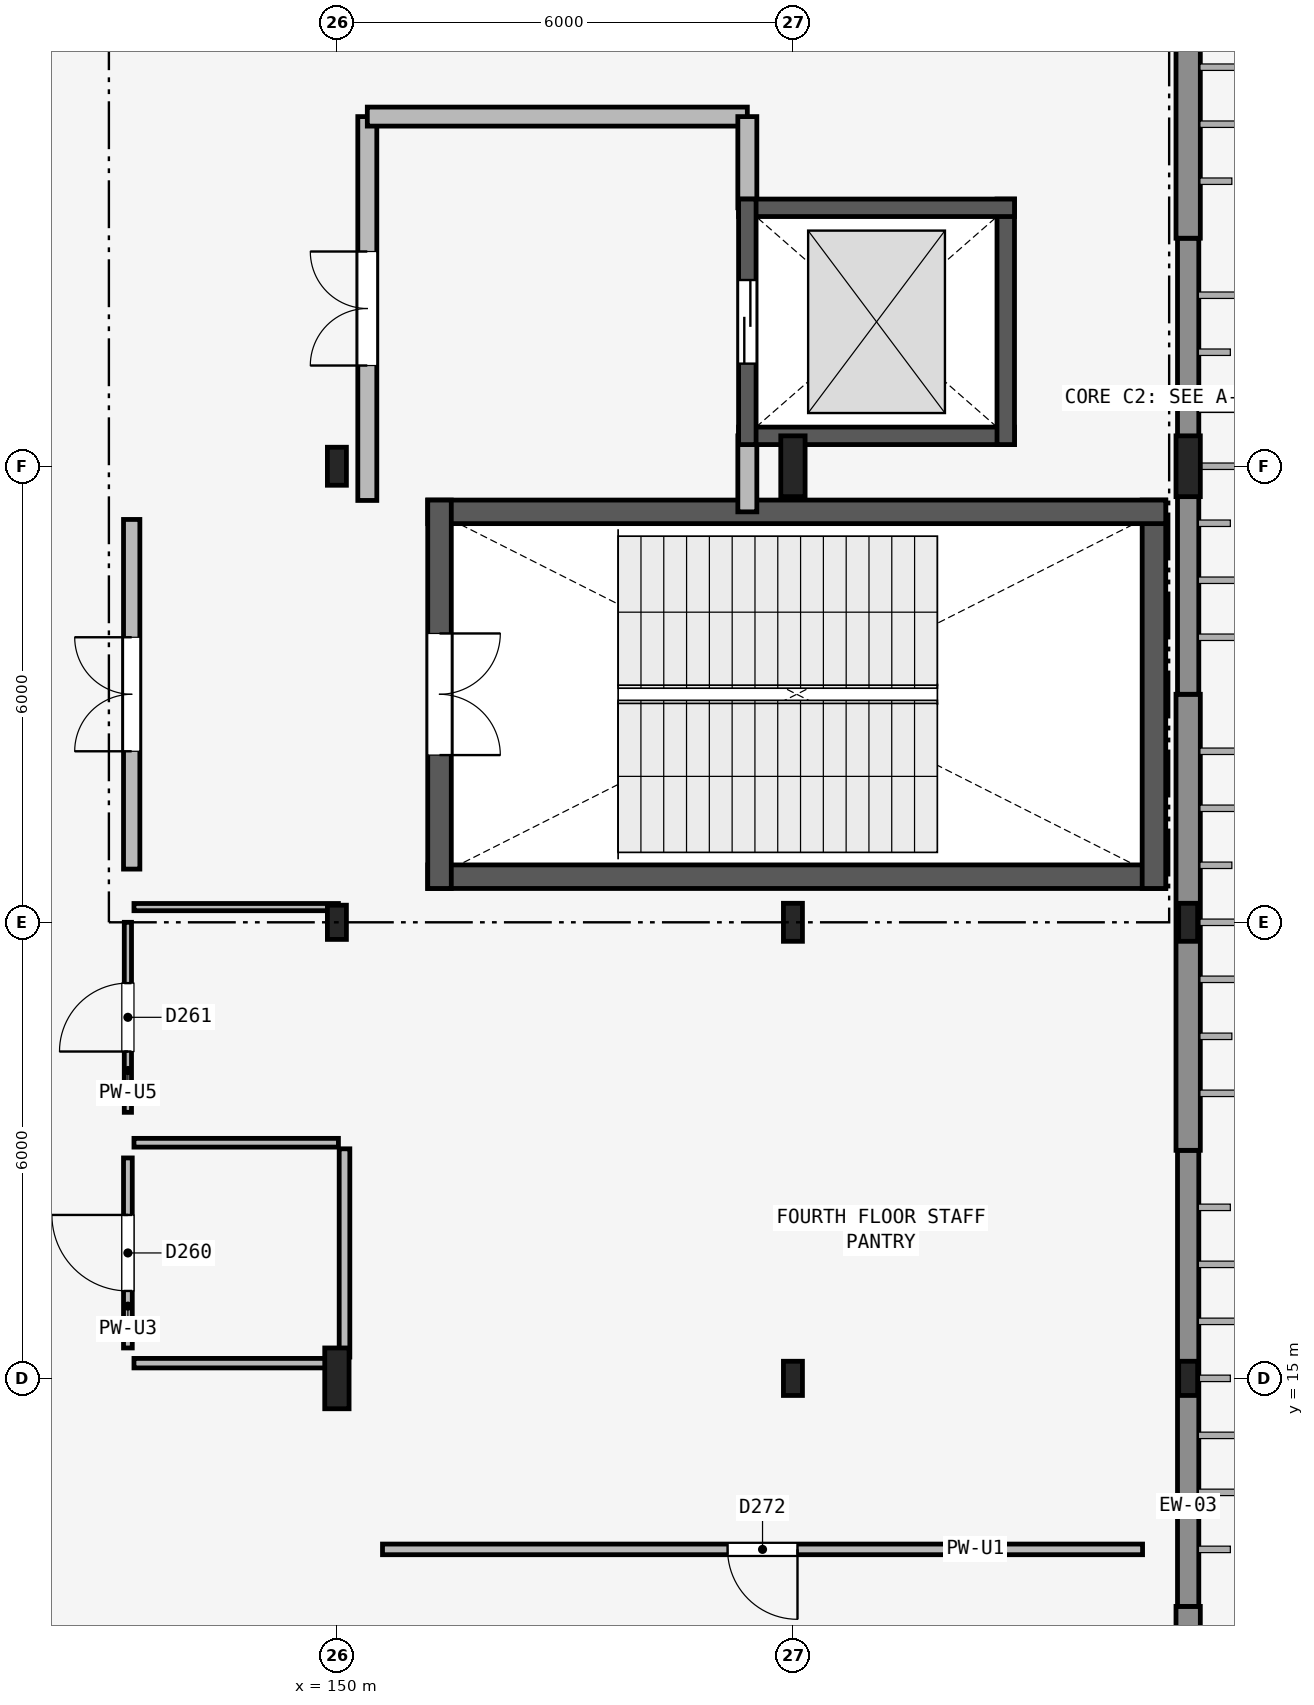
"""IFC4 building model, lengths in metres.
Left out: names, types, materials, properties, quantities, classifications, styles, units other than length and angle.
Written with IfcOpenShell. Run it as: python <this file> out.ifc"""

import sys

from ifc_helpers import new_model, si_unit, direction, frame, frame_2d, origin, origin_2d, place, context, subcontext, project, spatial, rectangle, i_section, extrude, element, fill, save


model = new_model("IFC4")
c1 = context("Model", 3, precision=1e-05, world=origin(), true_north=direction((0.0, 1.0)))
c2 = subcontext(c1, "Body", "Model", "MODEL_VIEW")
j1 = project(units=[si_unit("LENGTHUNIT", "METRE"), si_unit("PLANEANGLEUNIT", "RADIAN")], contexts=[c1])
p1 = place(None, origin())
s1 = spatial("IfcSite", under=j1, at=p1, CompositionType="ELEMENT")
p2 = place(p1, origin())
s2 = spatial("IfcBuilding", under=s1, at=p2, CompositionType="ELEMENT")
p3 = place(p2, frame((0.0, 0.0, 18.0)))
s3 = spatial("IfcBuildingStorey", under=s2, at=p3, CompositionType="ELEMENT", Elevation=18.0)
p4 = place(p3, frame((150.0, 15.0, 0.0), z_axis=(0.0, 0.0, 1.0), x_axis=(1.0, 0.0, 0.0)))
e1 = element("IfcColumn", 1, at=p4, inside=s3, PredefinedType="COLUMN", context=c2, shape_type="SweptSolid", body=[
    extrude(i_section(OverallWidth=0.32, OverallDepth=0.8, WebThickness=0.016, FlangeThickness=0.028, at=origin_2d()), origin(), (0.0, 0.0, 1.0), 4.2),
])
p5 = place(p3, frame((150.0, 21.0, 0.0), z_axis=(0.0, 0.0, 1.0), x_axis=(1.0, 0.0, 0.0)))
e2 = element("IfcColumn", 2, at=p5, inside=s3, PredefinedType="COLUMN", context=c2, shape_type="SweptSolid", body=[
    extrude(i_section(OverallWidth=0.25, OverallDepth=0.45, WebThickness=0.011, FlangeThickness=0.014, FilletRadius=0.015, at=origin_2d()), origin(), (0.0, 0.0, 1.0), 4.2),
])
p6 = place(p3, frame((150.0, 27.0, 0.0), z_axis=(0.0, 0.0, 1.0), x_axis=(1.0, 0.0, 0.0)))
e3 = element("IfcColumn", 3, at=p6, inside=s3, PredefinedType="COLUMN", context=c2, shape_type="SweptSolid", body=[
    extrude(i_section(OverallWidth=0.25, OverallDepth=0.5, WebThickness=0.01, FlangeThickness=0.015, FilletRadius=0.015, at=origin_2d()), origin(), (0.0, 0.0, 1.0), 4.2),
])
p7 = place(p3, frame((156.0, 15.0, 0.0), z_axis=(0.0, 0.0, 1.0), x_axis=(1.0, 0.0, 0.0)))
e4 = element("IfcColumn", 4, at=p7, inside=s3, PredefinedType="COLUMN", context=c2, shape_type="SweptSolid", body=[
    extrude(i_section(OverallWidth=0.25, OverallDepth=0.45, WebThickness=0.011, FlangeThickness=0.014, FilletRadius=0.015, at=origin_2d()), origin(), (0.0, 0.0, 1.0), 4.2),
])
p8 = place(p3, frame((156.0, 21.0, 0.0), z_axis=(0.0, 0.0, 1.0), x_axis=(1.0, 0.0, 0.0)))
e5 = element("IfcColumn", 5, at=p8, inside=s3, PredefinedType="COLUMN", context=c2, shape_type="SweptSolid", body=[
    extrude(i_section(OverallWidth=0.25, OverallDepth=0.5, WebThickness=0.01, FlangeThickness=0.015, FilletRadius=0.015, at=origin_2d()), origin(), (0.0, 0.0, 1.0), 4.2),
])
p9 = place(p3, frame((156.0, 27.0, 0.0), z_axis=(0.0, 0.0, 1.0), x_axis=(1.0, 0.0, 0.0)))
e6 = element("IfcColumn", 6, at=p9, inside=s3, PredefinedType="COLUMN", context=c2, shape_type="SweptSolid", body=[
    extrude(i_section(OverallWidth=0.32, OverallDepth=0.8, WebThickness=0.016, FlangeThickness=0.028, at=origin_2d()), origin(), (0.0, 0.0, 1.0), 4.2),
])
p10 = place(p3, frame((161.2, 15.0, 0.0), z_axis=(0.0, 0.0, 1.0), x_axis=(1.0, 0.0, 0.0)))
e7 = element("IfcColumn", 7, at=p10, inside=s3, PredefinedType="COLUMN", context=c2, shape_type="SweptSolid", body=[
    extrude(i_section(OverallWidth=0.25, OverallDepth=0.45, WebThickness=0.011, FlangeThickness=0.014, FilletRadius=0.015, at=origin_2d()), origin(), (0.0, 0.0, 1.0), 4.2),
])
p11 = place(p3, frame((161.2, 21.0, 0.0), z_axis=(0.0, 0.0, 1.0), x_axis=(1.0, 0.0, 0.0)))
e8 = element("IfcColumn", 8, at=p11, inside=s3, PredefinedType="COLUMN", context=c2, shape_type="SweptSolid", body=[
    extrude(i_section(OverallWidth=0.25, OverallDepth=0.5, WebThickness=0.01, FlangeThickness=0.015, FilletRadius=0.015, at=origin_2d()), origin(), (0.0, 0.0, 1.0), 4.2),
])
p12 = place(p3, frame((161.2, 27.0, 0.0), z_axis=(0.0, 0.0, 1.0), x_axis=(1.0, 0.0, 0.0)))
e9 = element("IfcColumn", 9, at=p12, inside=s3, PredefinedType="COLUMN", context=c2, shape_type="SweptSolid", body=[
    extrude(i_section(OverallWidth=0.32, OverallDepth=0.8, WebThickness=0.016, FlangeThickness=0.028, at=origin_2d()), origin(), (0.0, 0.0, 1.0), 4.2),
])
p13 = place(p3, frame((161.2, 6.0, 0.0), z_axis=(0.0, 0.0, 1.0), x_axis=(0.0, 1.0, 0.0)))
e10 = element("IfcWall", 10, at=p13, inside=s3, PredefinedType="SOLIDWALL", context=c2, shape_type="SweptSolid", body=[
    extrude(rectangle(XDim=6.0, YDim=0.32, at=frame_2d((3.0, 0.0))), origin(), (0.0, 0.0, 1.0), 3.39),
])
p14 = place(p3, frame((161.2, 12.0, 0.0), z_axis=(0.0, 0.0, 1.0), x_axis=(0.0, 1.0, 0.0)))
e11 = element("IfcWall", 11, at=p14, inside=s3, PredefinedType="SOLIDWALL", context=c2, shape_type="SweptSolid", body=[
    extrude(rectangle(XDim=6.0, YDim=0.28, at=frame_2d((3.0, 0.0))), origin(), (0.0, 0.0, 1.0), 3.39),
])
p15 = place(p3, frame((161.2, 18.0, 0.0), z_axis=(0.0, 0.0, 1.0), x_axis=(0.0, 1.0, 0.0)))
e12 = element("IfcWall", 12, at=p15, inside=s3, PredefinedType="SOLIDWALL", context=c2, shape_type="SweptSolid", body=[
    extrude(rectangle(XDim=6.0, YDim=0.32, at=frame_2d((3.0, 0.0))), origin(), (0.0, 0.0, 1.0), 3.39),
])
p16 = place(p3, frame((161.2, 24.0, 0.0), z_axis=(0.0, 0.0, 1.0), x_axis=(0.0, 1.0, 0.0)))
e13 = element("IfcWall", 13, at=p16, inside=s3, PredefinedType="SOLIDWALL", context=c2, shape_type="SweptSolid", body=[
    extrude(rectangle(XDim=6.0, YDim=0.28, at=frame_2d((3.0, 0.0))), origin(), (0.0, 0.0, 1.0), 3.39),
])
p17 = place(p3, frame((161.2, 30.0, 0.0), z_axis=(0.0, 0.0, 1.0), x_axis=(0.0, 1.0, 0.0)))
e14 = element("IfcWall", 14, at=p17, inside=s3, PredefinedType="SOLIDWALL", context=c2, shape_type="SweptSolid", body=[
    extrude(rectangle(XDim=6.0, YDim=0.32, at=frame_2d((3.0, 0.0))), origin(), (0.0, 0.0, 1.0), 3.39),
])
p18 = place(p3, frame((151.195, 21.6, 0.0), z_axis=(0.0, 0.0, 1.0), x_axis=(1.0, 0.0, 0.0)))
e15 = element("IfcWall", 15, at=p18, inside=s3, PredefinedType="SHEAR", context=c2, shape_type="SweptSolid", body=[
    extrude(rectangle(XDim=9.71, YDim=0.31, at=frame_2d((4.855, 0.0))), origin(), (0.0, 0.0, 1.0), 4.06),
])
p19 = place(p3, frame((160.75, 21.445, 0.0), z_axis=(0.0, 0.0, 1.0), x_axis=(0.0, 1.0, 0.0)))
e16 = element("IfcWall", 16, at=p19, inside=s3, PredefinedType="SHEAR", context=c2, shape_type="SweptSolid", body=[
    extrude(rectangle(XDim=5.11, YDim=0.31, at=frame_2d((2.555, 0.0))), origin(), (0.0, 0.0, 1.0), 4.06),
])
p20 = place(p3, frame((160.905, 26.4, 0.0), z_axis=(0.0, 0.0, 1.0), x_axis=(-1.0, 0.0, 0.0)))
e17 = element("IfcWall", 17, at=p20, inside=s3, PredefinedType="SHEAR", context=c2, shape_type="SweptSolid", body=[
    extrude(rectangle(XDim=9.71, YDim=0.31, at=frame_2d((4.855, 0.0))), origin(), (0.0, 0.0, 1.0), 4.06),
])
p21 = place(p3, frame((151.35, 26.555, 0.0), z_axis=(0.0, 0.0, 1.0), x_axis=(0.0, -1.0, 0.0)))
e18 = element("IfcWall", 18, at=p21, inside=s3, PredefinedType="SHEAR", context=c2, shape_type="SweptSolid", body=[
    extrude(rectangle(XDim=5.11, YDim=0.31, at=frame_2d((2.555, 0.0))), origin(), (0.0, 0.0, 1.0), 4.06),
])
p22 = place(p21, frame((1.755, 0.0, 0.0)))
e19 = element("IfcOpeningElement", 19, at=p22, cuts=e18, PredefinedType="OPENING", context=c2, shape_type="SweptSolid", body=[
    extrude(rectangle(XDim=1.6, YDim=2.2, at=frame_2d((0.8, 1.1))), frame((0.0, 0.165, 0.0), z_axis=(0.0, -1.0, 0.0), x_axis=(1.0, 0.0, 0.0)), (0.0, 0.0, 1.0), 0.33),
])
p23 = place(p3, frame((147.3, 21.7, 0.0), z_axis=(0.0, 0.0, 1.0), x_axis=(0.0, 1.0, 0.0)))
e20 = element("IfcWall", 20, at=p23, inside=s3, PredefinedType="PARTITIONING", context=c2, shape_type="SweptSolid", body=[
    extrude(rectangle(XDim=4.6, YDim=0.215, at=frame_2d((2.3, 0.0))), origin(), (0.0, 0.0, 1.0), 3.89),
])
p24 = place(p23, frame((1.55, 0.0, 0.0)))
e21 = element("IfcOpeningElement", 21, at=p24, cuts=e20, PredefinedType="OPENING", context=c2, shape_type="SweptSolid", body=[
    extrude(rectangle(XDim=1.5, YDim=2.15, at=frame_2d((0.75, 1.075))), frame((0.0, 0.117, 0.0), z_axis=(0.0, -1.0, 0.0), x_axis=(1.0, 0.0, 0.0)), (0.0, 0.0, 1.0), 0.235),
])
p25 = place(p3, frame((150.4, 26.55, 0.0), z_axis=(0.0, 0.0, 1.0), x_axis=(0.0, 1.0, 0.0)))
e22 = element("IfcWall", 22, at=p25, inside=s3, PredefinedType="PARTITIONING", context=c2, shape_type="SweptSolid", body=[
    extrude(rectangle(XDim=5.05, YDim=0.25, at=frame_2d((2.525, 0.0))), origin(), (0.0, 0.0, 1.0), 3.29),
])
p26 = place(p25, frame((1.775, 0.0, 0.0)))
e23 = element("IfcOpeningElement", 23, at=p26, cuts=e22, PredefinedType="OPENING", context=c2, shape_type="SweptSolid", body=[
    extrude(rectangle(XDim=1.5, YDim=2.15, at=frame_2d((0.75, 1.075))), frame((0.0, 0.135, 0.0), z_axis=(0.0, -1.0, 0.0), x_axis=(1.0, 0.0, 0.0)), (0.0, 0.0, 1.0), 0.27),
])
p27 = place(p3, frame((150.4, 31.6, 0.0), z_axis=(0.0, 0.0, 1.0), x_axis=(1.0, 0.0, 0.0)))
e24 = element("IfcWall", 24, at=p27, inside=s3, PredefinedType="PARTITIONING", context=c2, shape_type="SweptSolid", body=[
    extrude(rectangle(XDim=5.0, YDim=0.25, at=frame_2d((2.5, 0.0))), origin(), (0.0, 0.0, 1.0), 3.54),
])
p28 = place(p3, frame((155.4, 30.4, 0.0), z_axis=(0.0, 0.0, 1.0), x_axis=(0.0, 1.0, 0.0)))
e25 = element("IfcWall", 25, at=p28, inside=s3, PredefinedType="PARTITIONING", context=c2, shape_type="SweptSolid", body=[
    extrude(rectangle(XDim=1.2, YDim=0.25, at=frame_2d((0.6, 0.0))), origin(), (0.0, 0.0, 1.0), 3.89),
])
p29 = place(p3, frame((155.4, 26.4, 0.0), z_axis=(0.0, 0.0, 1.0), x_axis=(0.0, 1.0, 0.0)))
e26 = element("IfcWall", 26, at=p29, inside=s3, PredefinedType="PARTITIONING", context=c2, shape_type="SweptSolid", body=[
    extrude(rectangle(XDim=1.0, YDim=0.25, at=frame_2d((0.5, 0.0))), origin(), (0.0, 0.0, 1.0), 3.29),
])
p30 = place(p3, frame((155.285, 27.4, 0.0), z_axis=(0.0, 0.0, 1.0), x_axis=(1.0, 0.0, 0.0)))
e27 = element("IfcWall", 27, at=p30, inside=s3, PredefinedType="SHEAR", context=c2, shape_type="SweptSolid", body=[
    extrude(rectangle(XDim=3.63, YDim=0.23, at=frame_2d((1.815, 0.0))), origin(), (0.0, 0.0, 1.0), 4.2),
])
p31 = place(p3, frame((158.8, 27.285, 0.0), z_axis=(0.0, 0.0, 1.0), x_axis=(0.0, 1.0, 0.0)))
e28 = element("IfcWall", 28, at=p31, inside=s3, PredefinedType="SHEAR", context=c2, shape_type="SweptSolid", body=[
    extrude(rectangle(XDim=3.23, YDim=0.23, at=frame_2d((1.615, 0.0))), origin(), (0.0, 0.0, 1.0), 4.2),
])
p32 = place(p3, frame((158.915, 30.4, 0.0), z_axis=(0.0, 0.0, 1.0), x_axis=(-1.0, 0.0, 0.0)))
e29 = element("IfcWall", 29, at=p32, inside=s3, PredefinedType="SHEAR", context=c2, shape_type="SweptSolid", body=[
    extrude(rectangle(XDim=3.63, YDim=0.23, at=frame_2d((1.815, 0.0))), origin(), (0.0, 0.0, 1.0), 4.2),
])
p33 = place(p3, frame((155.4, 30.515, 0.0), z_axis=(0.0, 0.0, 1.0), x_axis=(0.0, -1.0, 0.0)))
e30 = element("IfcWall", 30, at=p33, inside=s3, PredefinedType="SHEAR", context=c2, shape_type="SweptSolid", body=[
    extrude(rectangle(XDim=3.23, YDim=0.23, at=frame_2d((1.615, 0.0))), origin(), (0.0, 0.0, 1.0), 4.2),
])
p34 = place(p33, frame((1.065, 0.0, 0.0)))
e31 = element("IfcOpeningElement", 31, at=p34, cuts=e30, PredefinedType="OPENING", context=c2, shape_type="SweptSolid", body=[
    extrude(rectangle(XDim=1.1, YDim=2.2, at=frame_2d((0.55, 1.1))), frame((0.0, 0.125, 0.0), z_axis=(0.0, -1.0, 0.0), x_axis=(1.0, 0.0, 0.0)), (0.0, 0.0, 1.0), 0.25),
])
p35 = place(p3, frame((147.25, 15.4, 0.0), z_axis=(0.0, 0.0, 1.0), x_axis=(0.0, 1.0, 0.0)))
e32 = element("IfcWall", 32, at=p35, inside=s3, PredefinedType="PARTITIONING", context=c2, shape_type="SweptSolid", body=[
    extrude(rectangle(XDim=2.5, YDim=0.115, at=frame_2d((1.25, 0.0))), origin(), (0.0, 0.0, 1.0), 3.89),
])
p36 = place(p35, frame((0.75, 0.0, 0.0)))
e33 = element("IfcOpeningElement", 33, at=p36, cuts=e32, PredefinedType="OPENING", context=c2, shape_type="SweptSolid", body=[
    extrude(rectangle(XDim=1.0, YDim=2.1, at=frame_2d((0.5, 1.05))), frame((0.0, 0.067, 0.0), z_axis=(0.0, -1.0, 0.0), x_axis=(1.0, 0.0, 0.0)), (0.0, 0.0, 1.0), 0.135),
])
p37 = place(p3, frame((147.25, 18.5, 0.0), z_axis=(0.0, 0.0, 1.0), x_axis=(0.0, 1.0, 0.0)))
e34 = element("IfcWall", 34, at=p37, inside=s3, PredefinedType="PARTITIONING", context=c2, shape_type="SweptSolid", body=[
    extrude(rectangle(XDim=2.5, YDim=0.095, at=frame_2d((1.25, 0.0))), origin(), (0.0, 0.0, 1.0), 3.49),
])
p38 = place(p37, frame((0.8, 0.0, 0.0)))
e35 = element("IfcOpeningElement", 35, at=p38, cuts=e34, PredefinedType="OPENING", context=c2, shape_type="SweptSolid", body=[
    extrude(rectangle(XDim=0.9, YDim=2.1, at=frame_2d((0.45, 1.05))), frame((0.0, 0.057, 0.0), z_axis=(0.0, -1.0, 0.0), x_axis=(1.0, 0.0, 0.0)), (0.0, 0.0, 1.0), 0.115),
])
p39 = place(p3, frame((160.6, 12.75, 0.0), z_axis=(0.0, 0.0, 1.0), x_axis=(-1.0, 0.0, 0.0)))
e36 = element("IfcWall", 36, at=p39, inside=s3, PredefinedType="PARTITIONING", context=c2, shape_type="SweptSolid", body=[
    extrude(rectangle(XDim=10.0, YDim=0.14, at=frame_2d((5.0, 0.0))), origin(), (0.0, 0.0, 1.0), 3.44),
])
p40 = place(p39, frame((4.54, 0.0, 0.0)))
e37 = element("IfcOpeningElement", 37, at=p40, cuts=e36, PredefinedType="OPENING", context=c2, shape_type="SweptSolid", body=[
    extrude(rectangle(XDim=0.92, YDim=2.1, at=frame_2d((0.46, 1.05))), frame((0.0, 0.08, 0.0), z_axis=(0.0, -1.0, 0.0), x_axis=(1.0, 0.0, 0.0)), (0.0, 0.0, 1.0), 0.16),
])
p41 = place(p3, frame((150.1, 18.02, 0.0), z_axis=(0.0, 0.0, 1.0), x_axis=(0.0, -1.0, 0.0)))
e38 = element("IfcWall", 38, at=p41, inside=s3, PredefinedType="PARTITIONING", context=c2, shape_type="SweptSolid", body=[
    extrude(rectangle(XDim=2.74, YDim=0.14, at=frame_2d((1.37, 0.0))), origin(), (0.0, 0.0, 1.0), 3.49),
])
p42 = place(p3, frame((150.02, 15.2, 0.0), z_axis=(0.0, 0.0, 1.0), x_axis=(-1.0, 0.0, 0.0)))
e39 = element("IfcWall", 39, at=p42, inside=s3, PredefinedType="PARTITIONING", context=c2, shape_type="SweptSolid", body=[
    extrude(rectangle(XDim=2.69, YDim=0.125, at=frame_2d((1.345, 0.0))), origin(), (0.0, 0.0, 1.0), 3.29),
])
p43 = place(p3, frame((147.33, 18.1, 0.0), z_axis=(0.0, 0.0, 1.0), x_axis=(1.0, 0.0, 0.0)))
e40 = element("IfcWall", 40, at=p43, inside=s3, PredefinedType="PARTITIONING", context=c2, shape_type="SweptSolid", body=[
    extrude(rectangle(XDim=2.69, YDim=0.115, at=frame_2d((1.345, 0.0))), origin(), (0.0, 0.0, 1.0), 3.49),
])
p44 = place(p3, frame((147.33, 21.2, 0.0), z_axis=(0.0, 0.0, 1.0), x_axis=(1.0, 0.0, 0.0)))
e41 = element("IfcWall", 41, at=p44, inside=s3, PredefinedType="PARTITIONING", context=c2, shape_type="SweptSolid", body=[
    extrude(rectangle(XDim=2.69, YDim=0.095, at=frame_2d((1.345, 0.0))), origin(), (0.0, 0.0, 1.0), 3.29),
])
p45 = place(p22, origin())
e42 = element("IfcDoor", 42, at=p45, inside=s3, OperationType="DOUBLE_DOOR_SINGLE_SWING", PredefinedType="DOOR", context=c2, shape_type="SweptSolid", body=[
    extrude(rectangle(XDim=1.6, YDim=2.2, at=frame_2d((0.8, 1.1))), frame((0.0, 0.025, 0.0), z_axis=(0.0, -1.0, 0.0), x_axis=(1.0, 0.0, 0.0)), (0.0, 0.0, 1.0), 0.05),
])
fill(e19, e42)
p46 = place(p24, origin())
e43 = element("IfcDoor", 43, at=p46, inside=s3, OperationType="DOUBLE_DOOR_SINGLE_SWING", PredefinedType="DOOR", context=c2, shape_type="SweptSolid", body=[
    extrude(rectangle(XDim=1.5, YDim=2.15, at=frame_2d((0.75, 1.075))), frame((0.0, 0.025, 0.0), z_axis=(0.0, -1.0, 0.0), x_axis=(1.0, 0.0, 0.0)), (0.0, 0.0, 1.0), 0.05),
])
fill(e21, e43)
p47 = place(p26, origin())
e44 = element("IfcDoor", 44, at=p47, inside=s3, OperationType="DOUBLE_DOOR_SINGLE_SWING", PredefinedType="DOOR", context=c2, shape_type="SweptSolid", body=[
    extrude(rectangle(XDim=1.5, YDim=2.15, at=frame_2d((0.75, 1.075))), frame((0.0, 0.025, 0.0), z_axis=(0.0, -1.0, 0.0), x_axis=(1.0, 0.0, 0.0)), (0.0, 0.0, 1.0), 0.05),
])
fill(e23, e44)
p48 = place(p34, origin())
e45 = element("IfcDoor", 45, at=p48, inside=s3, OperationType="SLIDING_TO_LEFT", PredefinedType="DOOR", context=c2, shape_type="SweptSolid", body=[
    extrude(rectangle(XDim=1.1, YDim=2.2, at=frame_2d((0.55, 1.1))), frame((0.0, 0.025, 0.0), z_axis=(0.0, -1.0, 0.0), x_axis=(1.0, 0.0, 0.0)), (0.0, 0.0, 1.0), 0.05),
])
fill(e31, e45)
p49 = place(p36, origin())
e46 = element("IfcDoor", 46, at=p49, inside=s3, OperationType="SINGLE_SWING_RIGHT", PredefinedType="DOOR", context=c2, shape_type="SweptSolid", body=[
    extrude(rectangle(XDim=1.0, YDim=2.1, at=frame_2d((0.5, 1.05))), frame((0.0, 0.025, 0.0), z_axis=(0.0, -1.0, 0.0), x_axis=(1.0, 0.0, 0.0)), (0.0, 0.0, 1.0), 0.05),
])
fill(e33, e46)
p50 = place(p38, origin())
e47 = element("IfcDoor", 47, at=p50, inside=s3, OperationType="SINGLE_SWING_LEFT", PredefinedType="DOOR", context=c2, shape_type="SweptSolid", body=[
    extrude(rectangle(XDim=0.9, YDim=2.1, at=frame_2d((0.45, 1.05))), frame((0.0, 0.025, 0.0), z_axis=(0.0, -1.0, 0.0), x_axis=(1.0, 0.0, 0.0)), (0.0, 0.0, 1.0), 0.05),
])
fill(e35, e47)
p51 = place(p40, origin())
e48 = element("IfcDoor", 48, at=p51, inside=s3, OperationType="SINGLE_SWING_LEFT", PredefinedType="DOOR", context=c2, shape_type="SweptSolid", body=[
    extrude(rectangle(XDim=0.92, YDim=2.1, at=frame_2d((0.46, 1.05))), frame((0.0, 0.025, 0.0), z_axis=(0.0, -1.0, 0.0), x_axis=(1.0, 0.0, 0.0)), (0.0, 0.0, 1.0), 0.05),
])
fill(e37, e48)
save(model, sys.argv[1])
